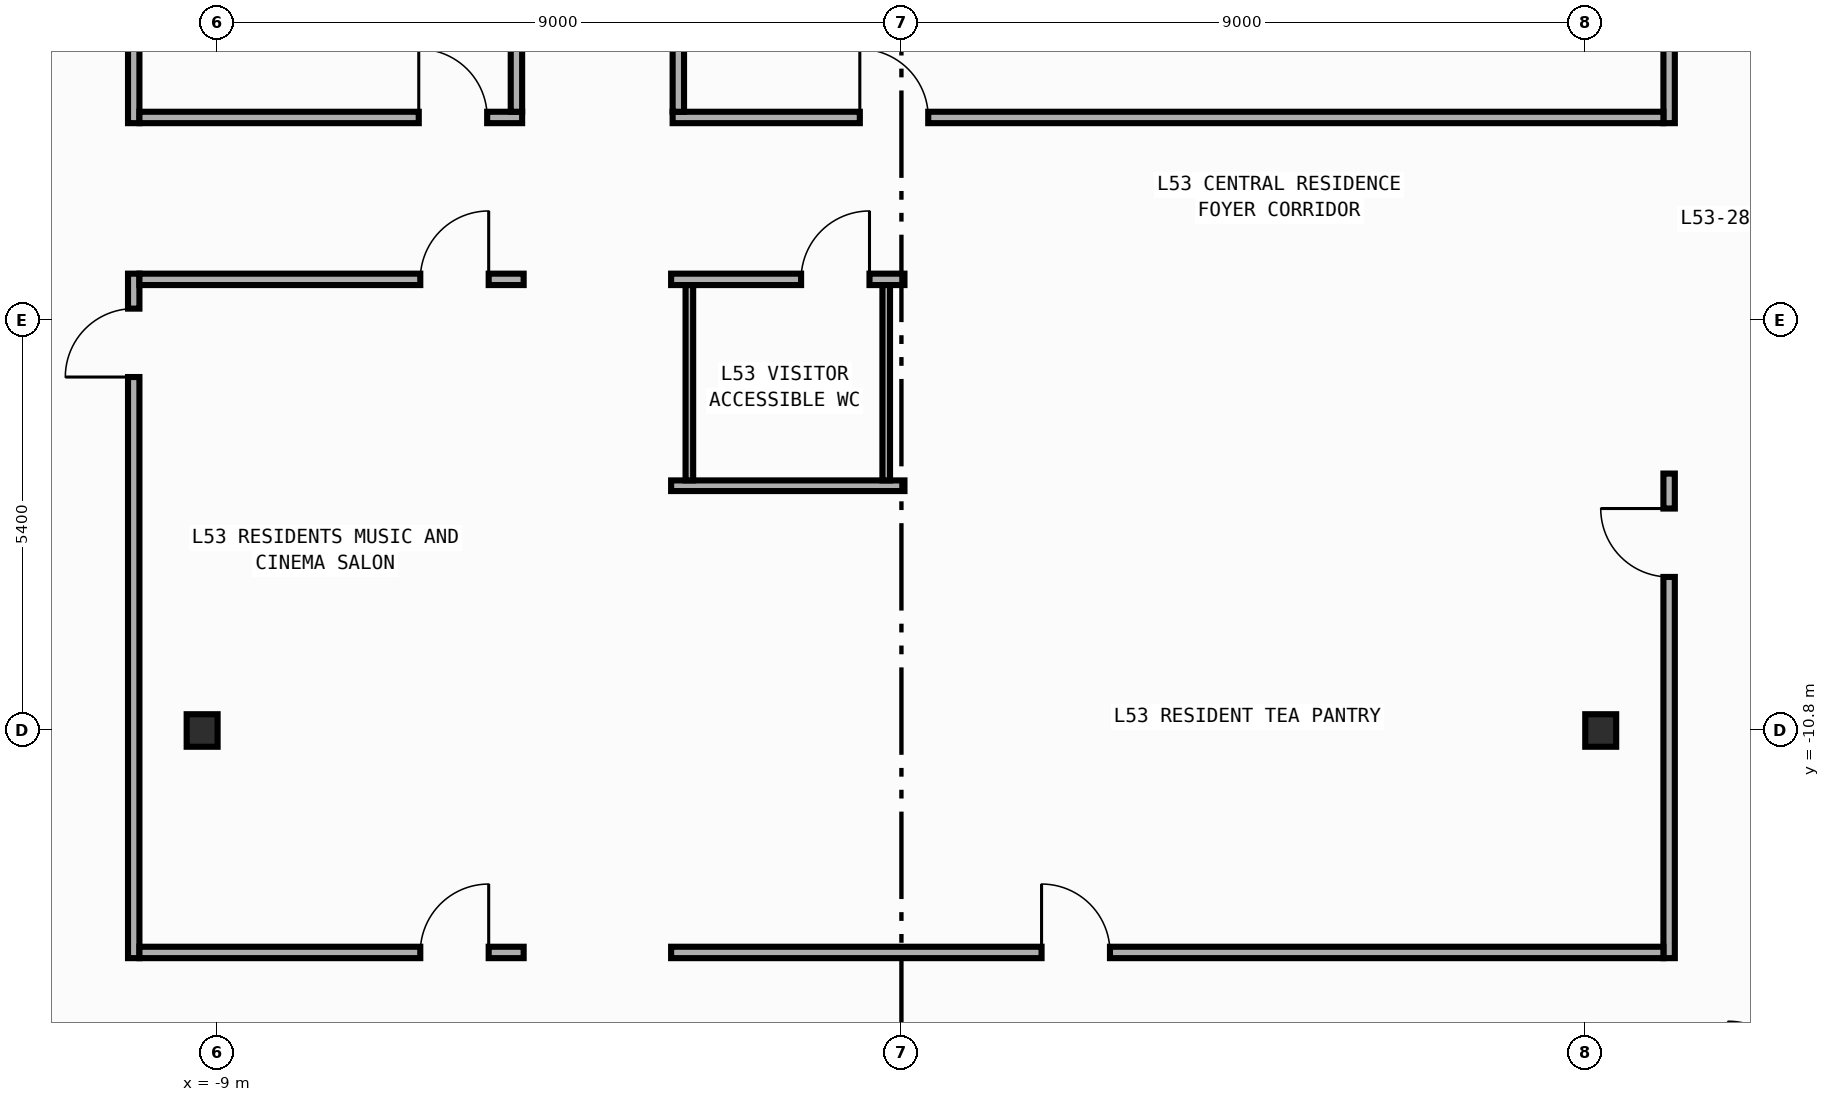
"""IFC4 building model, lengths in metres.
Left out: names, types, materials, properties, quantities, classifications, styles, units other than length and angle.
Written with IfcOpenShell. Run it as: python <this file> out.ifc"""

import sys

from ifc_helpers import new_model, si_unit, direction, frame, frame_2d, origin, origin_2d, place, context, subcontext, project, spatial, rectangle, i_section, extrude, element, fill, save


model = new_model("IFC4")
c1 = context("Model", 3, precision=1e-05, world=origin(), true_north=direction((0.0, 1.0)))
c2 = subcontext(c1, "Body", "Model", "MODEL_VIEW")
j1 = project(units=[si_unit("LENGTHUNIT", "METRE"), si_unit("PLANEANGLEUNIT", "RADIAN")], contexts=[c1])
p1 = place(None, origin())
s1 = spatial("IfcSite", under=j1, at=p1, CompositionType="ELEMENT")
p2 = place(p1, origin())
s2 = spatial("IfcBuilding", under=s1, at=p2, CompositionType="ELEMENT")
p3 = place(p2, frame((0.0, 0.0, 229.6)))
s3 = spatial("IfcBuildingStorey", under=s2, at=p3, CompositionType="ELEMENT", Elevation=229.6)
for number, where, z_axis, x_axis in (
    (1, (-9.2, -10.8, 0.0), (0.0, 0.0, 1.0), (1.0, 0.0, 0.0)),
    (2, (9.2, -10.8, 0.0), (0.0, 0.0, 1.0), (1.0, 0.0, 0.0)),
):
    element("IfcColumn", number, at=place(p3, frame(where, z_axis=z_axis, x_axis=x_axis)), inside=s3, PredefinedType="COLUMN", context=c2, shape_type="SweptSolid", body=[
        extrude(i_section(OverallWidth=0.407, OverallDepth=0.428, WebThickness=0.02, FlangeThickness=0.035, FilletRadius=0.022, at=origin_2d()), origin(), (0.0, 0.0, 1.0), 3.6),
    ])
p4 = place(p3, frame((-10.1, -2.81, 0.0), z_axis=(0.0, 0.0, 1.0), x_axis=(0.0, 1.0, 0.0)))
e3 = element("IfcWall", 3, at=p4, inside=s3, PredefinedType="PARTITIONING", context=c2, shape_type="SweptSolid", body=[
    extrude(rectangle(XDim=16.605, YDim=0.15, at=frame_2d((8.302, 0.0))), origin(), (0.0, 0.0, 1.0), 3.34),
])
p5 = place(p4, frame((7.751, 0.0, 0.0)))
e4 = element("IfcOpeningElement", 4, at=p5, cuts=e3, PredefinedType="OPENING", context=c2, shape_type="SweptSolid", body=[
    extrude(rectangle(XDim=0.9, YDim=2.15, at=frame_2d((0.45, 1.075))), frame((0.0, 0.085, 0.0), z_axis=(0.0, -1.0, 0.0), x_axis=(1.0, 0.0, 0.0)), (0.0, 0.0, 1.0), 0.17),
])
p6 = place(p3, frame((-10.1, -13.795, 0.0), z_axis=(0.0, 0.0, 1.0), x_axis=(0.0, 1.0, 0.0)))
e5 = element("IfcWall", 5, at=p6, inside=s3, PredefinedType="PARTITIONING", context=c2, shape_type="SweptSolid", body=[
    extrude(rectangle(XDim=9.005, YDim=0.15, at=frame_2d((4.502, 0.0))), origin(), (0.0, 0.0, 1.0), 3.34),
])
p7 = place(p6, frame((7.645, 0.0, 0.0)))
e6 = element("IfcOpeningElement", 6, at=p7, cuts=e5, PredefinedType="OPENING", context=c2, shape_type="SweptSolid", body=[
    extrude(rectangle(XDim=0.9, YDim=2.15, at=frame_2d((0.45, 1.075))), frame((0.0, 0.085, 0.0), z_axis=(0.0, -1.0, 0.0), x_axis=(1.0, 0.0, 0.0)), (0.0, 0.0, 1.0), 0.17),
])
p8 = place(p3, frame((10.1, -2.81, 0.0), z_axis=(0.0, 0.0, 1.0), x_axis=(0.0, 1.0, 0.0)))
e7 = element("IfcWall", 7, at=p8, inside=s3, PredefinedType="PARTITIONING", context=c2, shape_type="SweptSolid", body=[
    extrude(rectangle(XDim=16.605, YDim=0.15, at=frame_2d((8.302, 0.0))), origin(), (0.0, 0.0, 1.0), 3.34),
])
p9 = place(p8, frame((7.751, 0.0, 0.0)))
e8 = element("IfcOpeningElement", 8, at=p9, cuts=e7, PredefinedType="OPENING", context=c2, shape_type="SweptSolid", body=[
    extrude(rectangle(XDim=0.9, YDim=2.15, at=frame_2d((0.45, 1.075))), frame((0.0, 0.085, 0.0), z_axis=(0.0, -1.0, 0.0), x_axis=(1.0, 0.0, 0.0)), (0.0, 0.0, 1.0), 0.17),
])
p10 = place(p3, frame((10.1, -13.795, 0.0), z_axis=(0.0, 0.0, 1.0), x_axis=(0.0, 1.0, 0.0)))
e9 = element("IfcWall", 9, at=p10, inside=s3, PredefinedType="PARTITIONING", context=c2, shape_type="SweptSolid", body=[
    extrude(rectangle(XDim=6.375, YDim=0.15, at=frame_2d((3.188, 0.0))), origin(), (0.0, 0.0, 1.0), 3.34),
])
p11 = place(p10, frame((5.015, 0.0, 0.0)))
e10 = element("IfcOpeningElement", 10, at=p11, cuts=e9, PredefinedType="OPENING", context=c2, shape_type="SweptSolid", body=[
    extrude(rectangle(XDim=0.9, YDim=2.15, at=frame_2d((0.45, 1.075))), frame((0.0, 0.085, 0.0), z_axis=(0.0, -1.0, 0.0), x_axis=(1.0, 0.0, 0.0)), (0.0, 0.0, 1.0), 0.17),
])
p12 = place(p3, frame((-10.025, -2.735, 0.0), z_axis=(0.0, 0.0, 1.0), x_axis=(1.0, 0.0, 0.0)))
e11 = element("IfcWall", 11, at=p12, inside=s3, PredefinedType="PARTITIONING", context=c2, shape_type="SweptSolid", body=[
    extrude(rectangle(XDim=5.035, YDim=0.15, at=frame_2d((2.518, 0.0))), origin(), (0.0, 0.0, 1.0), 3.34),
])
p13 = place(p12, frame((3.675, 0.0, 0.0)))
e12 = element("IfcOpeningElement", 12, at=p13, cuts=e11, PredefinedType="OPENING", context=c2, shape_type="SweptSolid", body=[
    extrude(rectangle(XDim=0.9, YDim=2.15, at=frame_2d((0.45, 1.075))), frame((0.0, 0.085, 0.0), z_axis=(0.0, -1.0, 0.0), x_axis=(1.0, 0.0, 0.0)), (0.0, 0.0, 1.0), 0.17),
])
p14 = place(p3, frame((-10.025, -4.865, 0.0), z_axis=(0.0, 0.0, 1.0), x_axis=(1.0, 0.0, 0.0)))
e13 = element("IfcWall", 13, at=p14, inside=s3, PredefinedType="PARTITIONING", context=c2, shape_type="SweptSolid", body=[
    extrude(rectangle(XDim=5.055, YDim=0.15, at=frame_2d((2.527, 0.0))), origin(), (0.0, 0.0, 1.0), 3.34),
])
p15 = place(p14, frame((3.695, 0.0, 0.0)))
e14 = element("IfcOpeningElement", 14, at=p15, cuts=e13, PredefinedType="OPENING", context=c2, shape_type="SweptSolid", body=[
    extrude(rectangle(XDim=0.9, YDim=2.15, at=frame_2d((0.45, 1.075))), frame((0.0, 0.085, 0.0), z_axis=(0.0, -1.0, 0.0), x_axis=(1.0, 0.0, 0.0)), (0.0, 0.0, 1.0), 0.17),
])
p16 = place(p3, frame((-3.01, -2.735, 0.0), z_axis=(0.0, 0.0, 1.0), x_axis=(1.0, 0.0, 0.0)))
e15 = element("IfcWall", 15, at=p16, inside=s3, PredefinedType="PARTITIONING", context=c2, shape_type="SweptSolid", body=[
    extrude(rectangle(XDim=13.035, YDim=0.15, at=frame_2d((6.518, 0.0))), origin(), (0.0, 0.0, 1.0), 3.34),
])
p17 = place(p16, frame((2.463, 0.0, 0.0)))
e16 = element("IfcOpeningElement", 16, at=p17, cuts=e15, PredefinedType="OPENING", context=c2, shape_type="SweptSolid", body=[
    extrude(rectangle(XDim=0.9, YDim=2.15, at=frame_2d((0.45, 1.075))), frame((0.0, 0.085, 0.0), z_axis=(0.0, -1.0, 0.0), x_axis=(1.0, 0.0, 0.0)), (0.0, 0.0, 1.0), 0.17),
])
p18 = place(p3, frame((-3.03, -4.865, 0.0), z_axis=(0.0, 0.0, 1.0), x_axis=(1.0, 0.0, 0.0)))
e17 = element("IfcWall", 17, at=p18, inside=s3, PredefinedType="PARTITIONING", context=c2, shape_type="SweptSolid", body=[
    extrude(rectangle(XDim=3.07, YDim=0.15, at=frame_2d((1.535, 0.0))), origin(), (0.0, 0.0, 1.0), 3.34),
])
p19 = place(p18, frame((1.71, 0.0, 0.0)))
e18 = element("IfcOpeningElement", 18, at=p19, cuts=e17, PredefinedType="OPENING", context=c2, shape_type="SweptSolid", body=[
    extrude(rectangle(XDim=0.9, YDim=2.15, at=frame_2d((0.45, 1.075))), frame((0.0, 0.085, 0.0), z_axis=(0.0, -1.0, 0.0), x_axis=(1.0, 0.0, 0.0)), (0.0, 0.0, 1.0), 0.17),
])
p20 = place(p3, frame((-5.065, -2.66, 0.0), z_axis=(0.0, 0.0, 1.0), x_axis=(0.0, 1.0, 0.0)))
e19 = element("IfcWall", 19, at=p20, inside=s3, PredefinedType="PARTITIONING", context=c2, shape_type="SweptSolid", body=[
    extrude(rectangle(XDim=16.455, YDim=0.15, at=frame_2d((8.228, 0.0))), origin(), (0.0, 0.0, 1.0), 2.99),
])
p21 = place(p20, frame((7.677, 0.0, 0.0)))
e20 = element("IfcOpeningElement", 20, at=p21, cuts=e19, PredefinedType="OPENING", context=c2, shape_type="SweptSolid", body=[
    extrude(rectangle(XDim=0.9, YDim=2.15, at=frame_2d((0.45, 1.075))), frame((0.0, 0.085, 0.0), z_axis=(0.0, -1.0, 0.0), x_axis=(1.0, 0.0, 0.0)), (0.0, 0.0, 1.0), 0.17),
])
p22 = place(p3, frame((-2.935, -2.66, 0.0), z_axis=(0.0, 0.0, 1.0), x_axis=(0.0, 1.0, 0.0)))
e21 = element("IfcWall", 21, at=p22, inside=s3, PredefinedType="PARTITIONING", context=c2, shape_type="SweptSolid", body=[
    extrude(rectangle(XDim=16.455, YDim=0.15, at=frame_2d((8.228, 0.0))), origin(), (0.0, 0.0, 1.0), 3.34),
])
p23 = place(p22, frame((7.677, 0.0, 0.0)))
e22 = element("IfcOpeningElement", 22, at=p23, cuts=e21, PredefinedType="OPENING", context=c2, shape_type="SweptSolid", body=[
    extrude(rectangle(XDim=0.9, YDim=2.15, at=frame_2d((0.45, 1.075))), frame((0.0, 0.085, 0.0), z_axis=(0.0, -1.0, 0.0), x_axis=(1.0, 0.0, 0.0)), (0.0, 0.0, 1.0), 0.17),
])
p24 = place(p3, frame((-10.025, -13.72, 0.0), z_axis=(0.0, 0.0, 1.0), x_axis=(1.0, 0.0, 0.0)))
e23 = element("IfcWall", 23, at=p24, inside=s3, PredefinedType="PARTITIONING", context=c2, shape_type="SweptSolid", body=[
    extrude(rectangle(XDim=5.055, YDim=0.15, at=frame_2d((2.527, 0.0))), origin(), (0.0, 0.0, 1.0), 3.34),
])
p25 = place(p24, frame((3.695, 0.0, 0.0)))
e24 = element("IfcOpeningElement", 24, at=p25, cuts=e23, PredefinedType="OPENING", context=c2, shape_type="SweptSolid", body=[
    extrude(rectangle(XDim=0.9, YDim=2.15, at=frame_2d((0.45, 1.075))), frame((0.0, 0.085, 0.0), z_axis=(0.0, -1.0, 0.0), x_axis=(1.0, 0.0, 0.0)), (0.0, 0.0, 1.0), 0.17),
])
p26 = place(p3, frame((-3.03, -13.72, 0.0), z_axis=(0.0, 0.0, 1.0), x_axis=(1.0, 0.0, 0.0)))
e25 = element("IfcWall", 25, at=p26, inside=s3, PredefinedType="PARTITIONING", context=c2, shape_type="SweptSolid", body=[
    extrude(rectangle(XDim=13.055, YDim=0.15, at=frame_2d((6.527, 0.0))), origin(), (0.0, 0.0, 1.0), 3.34),
])
p27 = place(p26, frame((4.874, 0.0, 0.0)))
e26 = element("IfcOpeningElement", 26, at=p27, cuts=e25, PredefinedType="OPENING", context=c2, shape_type="SweptSolid", body=[
    extrude(rectangle(XDim=0.9, YDim=2.15, at=frame_2d((0.45, 1.075))), frame((0.0, 0.085, 0.0), z_axis=(0.0, -1.0, 0.0), x_axis=(1.0, 0.0, 0.0)), (0.0, 0.0, 1.0), 0.17),
])
p28 = place(p3, frame((-3.03, -7.58, 0.0), z_axis=(0.0, 0.0, 1.0), x_axis=(1.0, 0.0, 0.0)))
e27 = element("IfcWall", 27, at=p28, inside=s3, PredefinedType="PARTITIONING", context=c2, shape_type="SweptSolid", body=[
    extrude(rectangle(XDim=3.07, YDim=0.14, at=frame_2d((1.535, 0.0))), origin(), (0.0, 0.0, 1.0), 3.34),
])
for number, where, z_axis, x_axis in (
    (28, (-0.2, -4.94, 0.0), (0.0, 0.0, 1.0), (0.0, -1.0, 0.0)),
    (29, (-2.79, -7.51, 0.0), (0.0, 0.0, 1.0), (0.0, 1.0, 0.0)),
):
    element("IfcWall", number, at=place(p3, frame(where, z_axis=z_axis, x_axis=x_axis)), inside=s3, PredefinedType="PARTITIONING", context=c2, shape_type="SweptSolid", body=[
        extrude(rectangle(XDim=2.57, YDim=0.1, at=frame_2d((1.285, 0.0))), origin(), (0.0, 0.0, 1.0), 3.34),
    ])
p29 = place(p7, origin())
e30 = element("IfcDoor", 30, at=p29, inside=s3, OperationType="SINGLE_SWING_LEFT", PredefinedType="DOOR", context=c2, shape_type="SweptSolid", body=[
    extrude(rectangle(XDim=0.9, YDim=2.15, at=frame_2d((0.45, 1.075))), frame((0.0, 0.025, 0.0), z_axis=(0.0, -1.0, 0.0), x_axis=(1.0, 0.0, 0.0)), (0.0, 0.0, 1.0), 0.05),
])
fill(e6, e30)
p30 = place(p11, origin())
e31 = element("IfcDoor", 31, at=p30, inside=s3, OperationType="SINGLE_SWING_RIGHT", PredefinedType="DOOR", context=c2, shape_type="SweptSolid", body=[
    extrude(rectangle(XDim=0.9, YDim=2.15, at=frame_2d((0.45, 1.075))), frame((0.0, 0.025, 0.0), z_axis=(0.0, -1.0, 0.0), x_axis=(1.0, 0.0, 0.0)), (0.0, 0.0, 1.0), 0.05),
])
fill(e10, e31)
p31 = place(p13, origin())
e32 = element("IfcDoor", 32, at=p31, inside=s3, OperationType="SINGLE_SWING_LEFT", PredefinedType="DOOR", context=c2, shape_type="SweptSolid", body=[
    extrude(rectangle(XDim=0.9, YDim=2.15, at=frame_2d((0.45, 1.075))), frame((0.0, 0.025, 0.0), z_axis=(0.0, -1.0, 0.0), x_axis=(1.0, 0.0, 0.0)), (0.0, 0.0, 1.0), 0.05),
])
fill(e12, e32)
p32 = place(p15, origin())
e33 = element("IfcDoor", 33, at=p32, inside=s3, OperationType="SINGLE_SWING_RIGHT", PredefinedType="DOOR", context=c2, shape_type="SweptSolid", body=[
    extrude(rectangle(XDim=0.9, YDim=2.15, at=frame_2d((0.45, 1.075))), frame((0.0, 0.025, 0.0), z_axis=(0.0, -1.0, 0.0), x_axis=(1.0, 0.0, 0.0)), (0.0, 0.0, 1.0), 0.05),
])
fill(e14, e33)
p33 = place(p17, origin())
e34 = element("IfcDoor", 34, at=p33, inside=s3, OperationType="SINGLE_SWING_LEFT", PredefinedType="DOOR", context=c2, shape_type="SweptSolid", body=[
    extrude(rectangle(XDim=0.9, YDim=2.15, at=frame_2d((0.45, 1.075))), frame((0.0, 0.025, 0.0), z_axis=(0.0, -1.0, 0.0), x_axis=(1.0, 0.0, 0.0)), (0.0, 0.0, 1.0), 0.05),
])
fill(e16, e34)
p34 = place(p19, origin())
e35 = element("IfcDoor", 35, at=p34, inside=s3, OperationType="SINGLE_SWING_RIGHT", PredefinedType="DOOR", context=c2, shape_type="SweptSolid", body=[
    extrude(rectangle(XDim=0.9, YDim=2.15, at=frame_2d((0.45, 1.075))), frame((0.0, 0.025, 0.0), z_axis=(0.0, -1.0, 0.0), x_axis=(1.0, 0.0, 0.0)), (0.0, 0.0, 1.0), 0.05),
])
fill(e18, e35)
p35 = place(p25, origin())
e36 = element("IfcDoor", 36, at=p35, inside=s3, OperationType="SINGLE_SWING_RIGHT", PredefinedType="DOOR", context=c2, shape_type="SweptSolid", body=[
    extrude(rectangle(XDim=0.9, YDim=2.15, at=frame_2d((0.45, 1.075))), frame((0.0, 0.025, 0.0), z_axis=(0.0, -1.0, 0.0), x_axis=(1.0, 0.0, 0.0)), (0.0, 0.0, 1.0), 0.05),
])
fill(e24, e36)
p36 = place(p27, origin())
e37 = element("IfcDoor", 37, at=p36, inside=s3, OperationType="SINGLE_SWING_LEFT", PredefinedType="DOOR", context=c2, shape_type="SweptSolid", body=[
    extrude(rectangle(XDim=0.9, YDim=2.15, at=frame_2d((0.45, 1.075))), frame((0.0, 0.025, 0.0), z_axis=(0.0, -1.0, 0.0), x_axis=(1.0, 0.0, 0.0)), (0.0, 0.0, 1.0), 0.05),
])
fill(e26, e37)
save(model, sys.argv[1])
